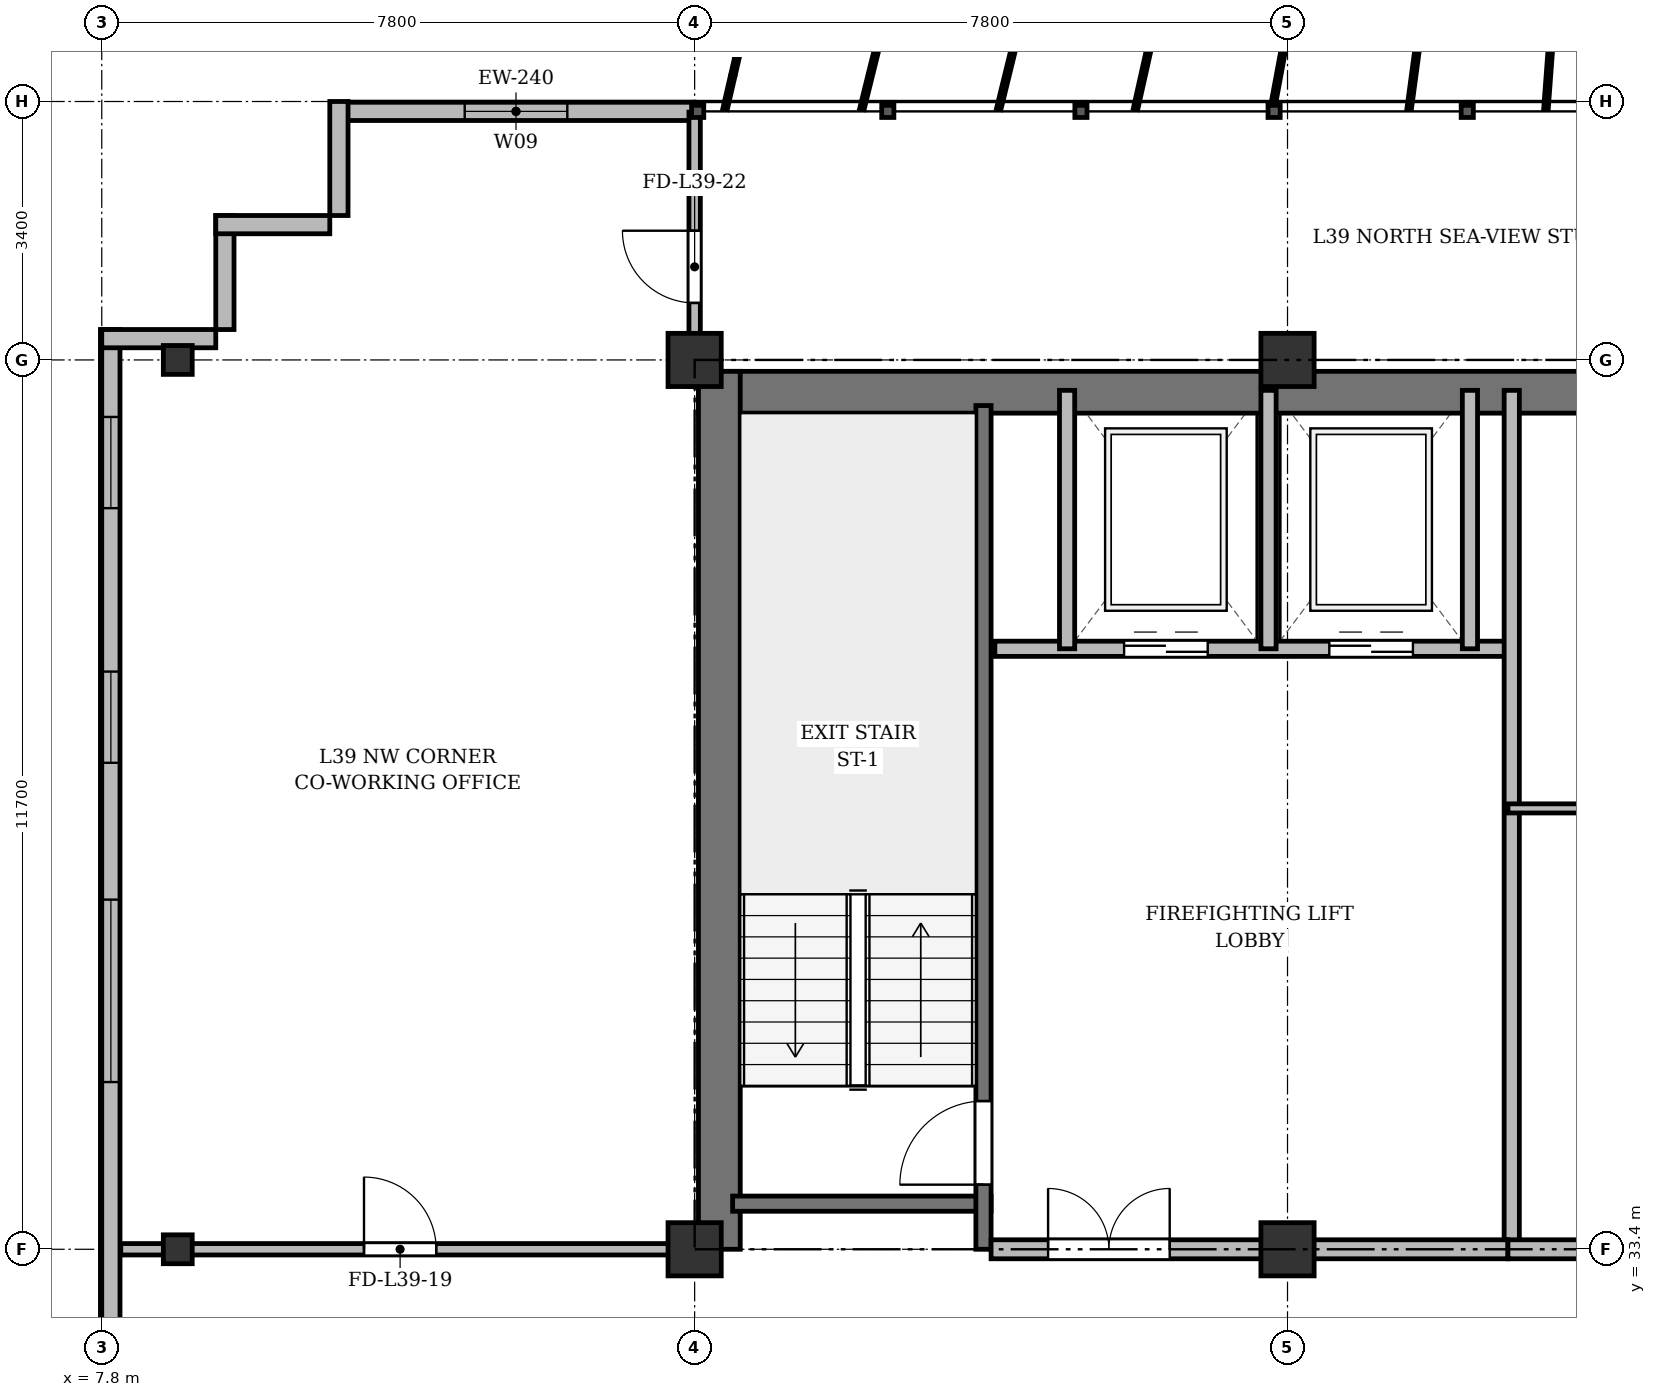
"""IFC4 building model, lengths in metres.
Left out: names, types, materials, properties, quantities, classifications, styles, units other than length and angle.
Written with IfcOpenShell. Run it as: python <this file> out.ifc"""

import sys

from ifc_helpers import new_model, si_unit, direction, frame, frame_2d, origin, origin_2d, place, context, subcontext, project, spatial, rectangle, i_section, extrude, source, transform, mapped, element, fill, save


model = new_model("IFC4")
c1 = context("Model", 3, precision=1e-05, world=origin(), true_north=direction((0.0, 1.0)))
c2 = subcontext(c1, "Body", "Model", "MODEL_VIEW")
j1 = project(units=[si_unit("LENGTHUNIT", "METRE"), si_unit("PLANEANGLEUNIT", "RADIAN")], contexts=[c1])
p1 = place(None, origin())
s1 = spatial("IfcSite", under=j1, at=p1, CompositionType="ELEMENT")
p2 = place(p1, origin())
s2 = spatial("IfcBuilding", under=s1, at=p2, CompositionType="ELEMENT")
p3 = place(p2, frame((0.0, 0.0, 150.1)))
s3 = spatial("IfcBuildingStorey", under=s2, at=p3, CompositionType="ELEMENT", Elevation=150.1)
m1 = source(origin(), c2, "Body", "SweptSolid", [
    extrude(i_section(OverallWidth=0.38, OverallDepth=0.38, WebThickness=0.02, FlangeThickness=0.03, at=origin_2d()), origin(), (0.0, 0.0, 1.0), 3.6),
])
for number, where, z_axis, x_axis in (
    (1, (8.8, 33.4, 0.0), (0.0, 0.0, 1.0), (1.0, 0.0, 0.0)),
    (2, (8.8, 45.1, 0.0), (0.0, 0.0, 1.0), (1.0, 0.0, 0.0)),
):
    element("IfcColumn", number, at=place(p3, frame(where, z_axis=z_axis, x_axis=x_axis)), inside=s3, PredefinedType="COLUMN", context=c2, shape_type="MappedRepresentation", body=[
        mapped(m1, transform((0.0, 0.0, 0.0), x_axis=(1.0, 0.0, 0.0), y_axis=(0.0, 1.0, 0.0), z_axis=(0.0, 0.0, 1.0), scale=1.0)),
    ])
m2 = source(origin(), c2, "Body", "SweptSolid", [
    extrude(rectangle(XDim=0.7, YDim=0.7, at=origin_2d()), origin(), (0.0, 0.0, 1.0), 3.6),
])
for number, where, z_axis, x_axis in (
    (3, (15.6, 33.4, 0.0), (0.0, 0.0, 1.0), (1.0, 0.0, 0.0)),
    (4, (15.6, 45.1, 0.0), (0.0, 0.0, 1.0), (1.0, 0.0, 0.0)),
    (5, (23.4, 33.4, 0.0), (0.0, 0.0, 1.0), (1.0, 0.0, 0.0)),
    (6, (23.4, 45.1, 0.0), (0.0, 0.0, 1.0), (1.0, 0.0, 0.0)),
):
    element("IfcColumn", number, at=place(p3, frame(where, z_axis=z_axis, x_axis=x_axis)), inside=s3, PredefinedType="COLUMN", context=c2, shape_type="MappedRepresentation", body=[
        mapped(m2, transform((0.0, 0.0, 0.0), x_axis=(1.0, 0.0, 0.0), y_axis=(0.0, 1.0, 0.0), z_axis=(0.0, 0.0, 1.0), scale=1.0)),
    ])
p4 = place(p3, frame((10.9, 48.37, 0.0), z_axis=(0.0, 0.0, 1.0), x_axis=(1.0, 0.0, 0.0)))
e7 = element("IfcWall", 7, at=p4, inside=s3, PredefinedType="SOLIDWALL", context=c2, shape_type="SweptSolid", body=[
    extrude(rectangle(XDim=4.7, YDim=0.24, at=frame_2d((2.35, 0.0))), origin(), (0.0, 0.0, 1.0), 3.35),
])
p5 = place(p4, frame((1.675, 0.0, 0.9)))
e8 = element("IfcOpeningElement", 8, at=p5, cuts=e7, PredefinedType="OPENING", context=c2, shape_type="SweptSolid", body=[
    extrude(rectangle(XDim=1.35, YDim=1.5, at=frame_2d((0.675, 0.75))), frame((0.0, 0.13, 0.0), z_axis=(0.0, -1.0, 0.0), x_axis=(1.0, 0.0, 0.0)), (0.0, 0.0, 1.0), 0.26),
])
p6 = place(p3, frame((7.92, 6.3, 0.0), z_axis=(0.0, 0.0, 1.0), x_axis=(0.0, 1.0, 0.0)))
e9 = element("IfcWall", 9, at=p6, inside=s3, PredefinedType="SOLIDWALL", context=c2, shape_type="SweptSolid", body=[
    extrude(rectangle(XDim=39.2, YDim=0.24, at=frame_2d((19.6, 0.0))), origin(), (0.0, 0.0, 1.0), 3.35),
])
p7 = place(p6, frame((1.45, 0.0, 0.92)))
e10 = element("IfcOpeningElement", 10, at=p7, cuts=e9, PredefinedType="OPENING", context=c2, shape_type="SweptSolid", body=[
    extrude(rectangle(XDim=1.2, YDim=1.65, at=frame_2d((0.6, 0.825))), frame((0.0, 0.13, 0.0), z_axis=(0.0, -1.0, 0.0), x_axis=(1.0, 0.0, 0.0)), (0.0, 0.0, 1.0), 0.26),
])
p8 = place(p6, frame((3.9, 0.0, 0.92)))
e11 = element("IfcOpeningElement", 11, at=p8, cuts=e9, PredefinedType="OPENING", context=c2, shape_type="SweptSolid", body=[
    extrude(rectangle(XDim=2.4, YDim=2.1, at=frame_2d((1.2, 1.05))), frame((0.0, 0.13, 0.0), z_axis=(0.0, -1.0, 0.0), x_axis=(1.0, 0.0, 0.0)), (0.0, 0.0, 1.0), 0.26),
])
p9 = place(p6, frame((8.1, 0.0, 0.92)))
e12 = element("IfcOpeningElement", 12, at=p9, cuts=e9, PredefinedType="OPENING", context=c2, shape_type="SweptSolid", body=[
    extrude(rectangle(XDim=2.4, YDim=2.1, at=frame_2d((1.2, 1.05))), frame((0.0, 0.13, 0.0), z_axis=(0.0, -1.0, 0.0), x_axis=(1.0, 0.0, 0.0)), (0.0, 0.0, 1.0), 0.26),
])
p10 = place(p6, frame((15.3, 0.0, 0.92)))
e13 = element("IfcOpeningElement", 13, at=p10, cuts=e9, PredefinedType="OPENING", context=c2, shape_type="SweptSolid", body=[
    extrude(rectangle(XDim=2.4, YDim=2.1, at=frame_2d((1.2, 1.05))), frame((0.0, 0.13, 0.0), z_axis=(0.0, -1.0, 0.0), x_axis=(1.0, 0.0, 0.0)), (0.0, 0.0, 1.0), 0.26),
])
p11 = place(p6, frame((29.3, 0.0, 0.92)))
e14 = element("IfcOpeningElement", 14, at=p11, cuts=e9, PredefinedType="OPENING", context=c2, shape_type="SweptSolid", body=[
    extrude(rectangle(XDim=2.4, YDim=2.1, at=frame_2d((1.2, 1.05))), frame((0.0, 0.13, 0.0), z_axis=(0.0, -1.0, 0.0), x_axis=(1.0, 0.0, 0.0)), (0.0, 0.0, 1.0), 0.26),
])
p12 = place(p6, frame((33.5, 0.0, 0.92)))
e15 = element("IfcOpeningElement", 15, at=p12, cuts=e9, PredefinedType="OPENING", context=c2, shape_type="SweptSolid", body=[
    extrude(rectangle(XDim=1.2, YDim=1.65, at=frame_2d((0.6, 0.825))), frame((0.0, 0.13, 0.0), z_axis=(0.0, -1.0, 0.0), x_axis=(1.0, 0.0, 0.0)), (0.0, 0.0, 1.0), 0.26),
])
p13 = place(p6, frame((36.85, 0.0, 0.92)))
e16 = element("IfcOpeningElement", 16, at=p13, cuts=e9, PredefinedType="OPENING", context=c2, shape_type="SweptSolid", body=[
    extrude(rectangle(XDim=1.2, YDim=1.65, at=frame_2d((0.6, 0.825))), frame((0.0, 0.13, 0.0), z_axis=(0.0, -1.0, 0.0), x_axis=(1.0, 0.0, 0.0)), (0.0, 0.0, 1.0), 0.26),
])
for number, where, z_axis, x_axis in (
    (17, (7.8, 45.38, 0.0), (0.0, 0.0, 1.0), (1.0, 0.0, 0.0)),
    (18, (9.42, 45.5, 0.0), (0.0, 0.0, 1.0), (0.0, 1.0, 0.0)),
    (19, (9.3, 46.88, 0.0), (0.0, 0.0, 1.0), (1.0, 0.0, 0.0)),
    (20, (10.92, 47.0, 0.0), (0.0, 0.0, 1.0), (0.0, 1.0, 0.0)),
):
    element("IfcWall", number, at=place(p3, frame(where, z_axis=z_axis, x_axis=x_axis)), inside=s3, PredefinedType="SOLIDWALL", context=c2, shape_type="SweptSolid", body=[
        extrude(rectangle(XDim=1.5, YDim=0.24, at=frame_2d((0.75, 0.0))), origin(), (0.0, 0.0, 1.0), 3.35),
    ])
p14 = place(p3, frame((15.65, 44.675, 0.0), z_axis=(0.0, 0.0, 1.0), x_axis=(1.0, 0.0, 0.0)))
e21 = element("IfcWall", 21, at=p14, inside=s3, PredefinedType="SHEAR", context=c2, shape_type="SweptSolid", body=[
    extrude(rectangle(XDim=43.1, YDim=0.55, at=frame_2d((21.55, 0.0))), origin(), (0.0, 0.0, 1.0), 3.35),
])
p15 = place(p3, frame((15.925, 33.4, 0.0), z_axis=(0.0, 0.0, 1.0), x_axis=(0.0, 1.0, 0.0)))
e22 = element("IfcWall", 22, at=p15, inside=s3, PredefinedType="SHEAR", context=c2, shape_type="SweptSolid", body=[
    extrude(rectangle(XDim=11.55, YDim=0.55, at=frame_2d((5.775, 0.0))), origin(), (0.0, 0.0, 1.0), 3.35),
])
p16 = place(p3, frame((16.1, 34.0, 0.0), z_axis=(0.0, 0.0, 1.0), x_axis=(1.0, 0.0, 0.0)))
e23 = element("IfcWall", 23, at=p16, inside=s3, PredefinedType="SHEAR", context=c2, shape_type="SweptSolid", body=[
    extrude(rectangle(XDim=3.4, YDim=0.2, at=frame_2d((1.7, 0.0))), origin(), (0.0, 0.0, 1.0), 3.35),
])
p17 = place(p3, frame((19.4, 33.4, 0.0), z_axis=(0.0, 0.0, 1.0), x_axis=(0.0, 1.0, 0.0)))
e24 = element("IfcWall", 24, at=p17, inside=s3, PredefinedType="SHEAR", context=c2, shape_type="SweptSolid", body=[
    extrude(rectangle(XDim=11.1, YDim=0.2, at=frame_2d((5.55, 0.0))), origin(), (0.0, 0.0, 1.0), 3.35),
])
p18 = place(p17, frame((0.85, 0.0, 0.0)))
e25 = element("IfcOpeningElement", 25, at=p18, cuts=e24, PredefinedType="OPENING", context=c2, shape_type="SweptSolid", body=[
    extrude(rectangle(XDim=1.1, YDim=2.15, at=frame_2d((0.55, 1.075))), frame((0.0, 0.11, 0.0), z_axis=(0.0, -1.0, 0.0), x_axis=(1.0, 0.0, 0.0)), (0.0, 0.0, 1.0), 0.22),
])
p19 = place(p3, frame((19.55, 41.3, 0.0), z_axis=(0.0, 0.0, 1.0), x_axis=(1.0, 0.0, 0.0)))
e26 = element("IfcWall", 26, at=p19, inside=s3, PredefinedType="SOLIDWALL", context=c2, shape_type="SweptSolid", body=[
    extrude(rectangle(XDim=6.75, YDim=0.2, at=frame_2d((3.375, 0.0))), origin(), (0.0, 0.0, 1.0), 3.35),
])
p20 = place(p19, frame((1.7, 0.0, 0.0)))
e27 = element("IfcOpeningElement", 27, at=p20, cuts=e26, PredefinedType="OPENING", context=c2, shape_type="SweptSolid", body=[
    extrude(rectangle(XDim=1.1, YDim=2.15, at=frame_2d((0.55, 1.075))), frame((0.0, 0.11, 0.0), z_axis=(0.0, -1.0, 0.0), x_axis=(1.0, 0.0, 0.0)), (0.0, 0.0, 1.0), 0.22),
])
p21 = place(p19, frame((4.4, 0.0, 0.0)))
e28 = element("IfcOpeningElement", 28, at=p21, cuts=e26, PredefinedType="OPENING", context=c2, shape_type="SweptSolid", body=[
    extrude(rectangle(XDim=1.1, YDim=2.15, at=frame_2d((0.55, 1.075))), frame((0.0, 0.11, 0.0), z_axis=(0.0, -1.0, 0.0), x_axis=(1.0, 0.0, 0.0)), (0.0, 0.0, 1.0), 0.22),
])
for number, where, z_axis, x_axis in (
    (29, (20.5, 41.3, 0.0), (0.0, 0.0, 1.0), (0.0, 1.0, 0.0)),
    (30, (23.15, 41.3, 0.0), (0.0, 0.0, 1.0), (0.0, 1.0, 0.0)),
    (31, (25.8, 41.3, 0.0), (0.0, 0.0, 1.0), (0.0, 1.0, 0.0)),
):
    element("IfcWall", number, at=place(p3, frame(where, z_axis=z_axis, x_axis=x_axis)), inside=s3, PredefinedType="SOLIDWALL", context=c2, shape_type="SweptSolid", body=[
        extrude(rectangle(XDim=3.4, YDim=0.2, at=frame_2d((1.7, 0.0))), origin(), (0.0, 0.0, 1.0), 3.35),
    ])
p22 = place(p3, frame((26.35, 33.4, 0.0), z_axis=(0.0, 0.0, 1.0), x_axis=(0.0, 1.0, 0.0)))
e32 = element("IfcWall", 32, at=p22, inside=s3, PredefinedType="SOLIDWALL", context=c2, shape_type="SweptSolid", body=[
    extrude(rectangle(XDim=11.3, YDim=0.2, at=frame_2d((5.65, 0.0))), origin(), (0.0, 0.0, 1.0), 2.75),
])
p23 = place(p3, frame((19.5, 33.4, 0.0), z_axis=(0.0, 0.0, 1.0), x_axis=(1.0, 0.0, 0.0)))
e33 = element("IfcWall", 33, at=p23, inside=s3, PredefinedType="PARTITIONING", context=c2, shape_type="SweptSolid", body=[
    extrude(rectangle(XDim=6.8, YDim=0.25, at=frame_2d((3.4, 0.0))), origin(), (0.0, 0.0, 1.0), 2.75),
])
p24 = place(p23, frame((0.75, 0.0, 0.0)))
e34 = element("IfcOpeningElement", 34, at=p24, cuts=e33, PredefinedType="OPENING", context=c2, shape_type="SweptSolid", body=[
    extrude(rectangle(XDim=1.6, YDim=2.2, at=frame_2d((0.8, 1.1))), frame((0.0, 0.135, 0.0), z_axis=(0.0, -1.0, 0.0), x_axis=(1.0, 0.0, 0.0)), (0.0, 0.0, 1.0), 0.27),
])
p25 = place(p3, frame((26.3, 39.2, 0.0), z_axis=(0.0, 0.0, 1.0), x_axis=(1.0, 0.0, 0.0)))
e35 = element("IfcWall", 35, at=p25, inside=s3, PredefinedType="PARTITIONING", context=c2, shape_type="SweptSolid", body=[
    extrude(rectangle(XDim=7.0, YDim=0.12, at=frame_2d((3.5, 0.0))), origin(), (0.0, 0.0, 1.0), 2.85),
])
p26 = place(p25, frame((2.6, 0.0, 0.0)))
e36 = element("IfcOpeningElement", 36, at=p26, cuts=e35, PredefinedType="OPENING", context=c2, shape_type="SweptSolid", body=[
    extrude(rectangle(XDim=0.95, YDim=2.15, at=frame_2d((0.475, 1.075))), frame((0.0, 0.07, 0.0), z_axis=(0.0, -1.0, 0.0), x_axis=(1.0, 0.0, 0.0)), (0.0, 0.0, 1.0), 0.14),
])
p27 = place(p3, frame((26.3, 33.4, 0.0), z_axis=(0.0, 0.0, 1.0), x_axis=(1.0, 0.0, 0.0)))
e37 = element("IfcWall", 37, at=p27, inside=s3, PredefinedType="PARTITIONING", context=c2, shape_type="SweptSolid", body=[
    extrude(rectangle(XDim=7.0, YDim=0.25, at=frame_2d((3.5, 0.0))), origin(), (0.0, 0.0, 1.0), 2.75),
])
p28 = place(p27, frame((1.35, 0.0, 0.0)))
e38 = element("IfcOpeningElement", 38, at=p28, cuts=e37, PredefinedType="OPENING", context=c2, shape_type="SweptSolid", body=[
    extrude(rectangle(XDim=0.95, YDim=2.15, at=frame_2d((0.475, 1.075))), frame((0.0, 0.135, 0.0), z_axis=(0.0, -1.0, 0.0), x_axis=(1.0, 0.0, 0.0)), (0.0, 0.0, 1.0), 0.27),
])
p29 = place(p3, frame((8.05, 33.4, 0.0), z_axis=(0.0, 0.0, 1.0), x_axis=(1.0, 0.0, 0.0)))
e39 = element("IfcWall", 39, at=p29, inside=s3, PredefinedType="PARTITIONING", context=c2, shape_type="SweptSolid", body=[
    extrude(rectangle(XDim=7.55, YDim=0.15, at=frame_2d((3.775, 0.0))), origin(), (0.0, 0.0, 1.0), 2.75),
])
p30 = place(p29, frame((3.2, 0.0, 0.0)))
e40 = element("IfcOpeningElement", 40, at=p30, cuts=e39, PredefinedType="OPENING", context=c2, shape_type="SweptSolid", body=[
    extrude(rectangle(XDim=0.95, YDim=2.15, at=frame_2d((0.475, 1.075))), frame((0.0, 0.085, 0.0), z_axis=(0.0, -1.0, 0.0), x_axis=(1.0, 0.0, 0.0)), (0.0, 0.0, 1.0), 0.17),
])
p31 = place(p3, frame((15.6, 44.75, 0.0), z_axis=(0.0, 0.0, 1.0), x_axis=(0.0, 1.0, 0.0)))
e41 = element("IfcWall", 41, at=p31, inside=s3, PredefinedType="PARTITIONING", context=c2, shape_type="SweptSolid", body=[
    extrude(rectangle(XDim=3.61, YDim=0.15, at=frame_2d((1.805, 0.0))), origin(), (0.0, 0.0, 1.0), 2.85),
])
p32 = place(p31, frame((1.1, 0.0, 0.0)))
e42 = element("IfcOpeningElement", 42, at=p32, cuts=e41, PredefinedType="OPENING", context=c2, shape_type="SweptSolid", body=[
    extrude(rectangle(XDim=0.95, YDim=2.15, at=frame_2d((0.475, 1.075))), frame((0.0, 0.085, 0.0), z_axis=(0.0, -1.0, 0.0), x_axis=(1.0, 0.0, 0.0)), (0.0, 0.0, 1.0), 0.17),
])
m3 = source(origin(), c2, "Body", "SweptSolid", [
    extrude(rectangle(XDim=1.35, YDim=1.5, at=frame_2d((0.675, 0.75))), frame((0.0, 0.03, 0.0), z_axis=(0.0, -1.0, 0.0), x_axis=(1.0, 0.0, 0.0)), (0.0, 0.0, 1.0), 0.06),
])
p33 = place(p5, origin())
e43 = element("IfcWindow", 43, at=p33, inside=s3, PartitioningType="SINGLE_PANEL", PredefinedType="WINDOW", context=c2, shape_type="MappedRepresentation", body=[
    mapped(m3, transform((0.0, 0.0, 0.0), x_axis=(1.0, 0.0, 0.0), y_axis=(0.0, 1.0, 0.0), z_axis=(0.0, 0.0, 1.0), scale=1.0)),
])
fill(e8, e43)
m4 = source(origin(), c2, "Body", "SweptSolid", [
    extrude(rectangle(XDim=2.4, YDim=2.1, at=frame_2d((1.2, 1.05))), frame((0.0, 0.03, 0.0), z_axis=(0.0, -1.0, 0.0), x_axis=(1.0, 0.0, 0.0)), (0.0, 0.0, 1.0), 0.06),
])
p34 = place(p11, origin())
e44 = element("IfcWindow", 44, at=p34, inside=s3, PartitioningType="SINGLE_PANEL", PredefinedType="WINDOW", context=c2, shape_type="MappedRepresentation", body=[
    mapped(m4, transform((0.0, 0.0, 0.0), x_axis=(1.0, 0.0, 0.0), y_axis=(0.0, 1.0, 0.0), z_axis=(0.0, 0.0, 1.0), scale=1.0)),
])
fill(e14, e44)
m5 = source(origin(), c2, "Body", "SweptSolid", [
    extrude(rectangle(XDim=1.2, YDim=1.65, at=frame_2d((0.6, 0.825))), frame((0.0, 0.03, 0.0), z_axis=(0.0, -1.0, 0.0), x_axis=(1.0, 0.0, 0.0)), (0.0, 0.0, 1.0), 0.06),
])
p35 = place(p12, origin())
e45 = element("IfcWindow", 45, at=p35, inside=s3, PartitioningType="SINGLE_PANEL", PredefinedType="WINDOW", context=c2, shape_type="MappedRepresentation", body=[
    mapped(m5, transform((0.0, 0.0, 0.0), x_axis=(1.0, 0.0, 0.0), y_axis=(0.0, 1.0, 0.0), z_axis=(0.0, 0.0, 1.0), scale=1.0)),
])
fill(e15, e45)
p36 = place(p13, origin())
e46 = element("IfcWindow", 46, at=p36, inside=s3, PartitioningType="SINGLE_PANEL", PredefinedType="WINDOW", context=c2, shape_type="MappedRepresentation", body=[
    mapped(m5, transform((0.0, 0.0, 0.0), x_axis=(1.0, 0.0, 0.0), y_axis=(0.0, 1.0, 0.0), z_axis=(0.0, 0.0, 1.0), scale=1.0)),
])
fill(e16, e46)
m6 = source(origin(), c2, "Body", "SweptSolid", [
    extrude(rectangle(XDim=1.1, YDim=2.15, at=frame_2d((0.55, 1.075))), frame((0.0, 0.025, 0.0), z_axis=(0.0, -1.0, 0.0), x_axis=(1.0, 0.0, 0.0)), (0.0, 0.0, 1.0), 0.05),
])
p37 = place(p18, origin())
e47 = element("IfcDoor", 47, at=p37, inside=s3, OperationType="SINGLE_SWING_LEFT", PredefinedType="DOOR", context=c2, shape_type="MappedRepresentation", body=[
    mapped(m6, transform((0.0, 0.0, 0.0), x_axis=(1.0, 0.0, 0.0), y_axis=(0.0, 1.0, 0.0), z_axis=(0.0, 0.0, 1.0), scale=1.0)),
])
fill(e25, e47)
p38 = place(p20, origin())
e48 = element("IfcDoor", 48, at=p38, inside=s3, OperationType="DOUBLE_DOOR_SLIDING", PredefinedType="DOOR", context=c2, shape_type="MappedRepresentation", body=[
    mapped(m6, transform((0.0, 0.0, 0.0), x_axis=(1.0, 0.0, 0.0), y_axis=(0.0, 1.0, 0.0), z_axis=(0.0, 0.0, 1.0), scale=1.0)),
])
fill(e27, e48)
p39 = place(p21, origin())
e49 = element("IfcDoor", 49, at=p39, inside=s3, OperationType="DOUBLE_DOOR_SLIDING", PredefinedType="DOOR", context=c2, shape_type="MappedRepresentation", body=[
    mapped(m6, transform((0.0, 0.0, 0.0), x_axis=(1.0, 0.0, 0.0), y_axis=(0.0, 1.0, 0.0), z_axis=(0.0, 0.0, 1.0), scale=1.0)),
])
fill(e28, e49)
m7 = source(origin(), c2, "Body", "SweptSolid", [
    extrude(rectangle(XDim=1.6, YDim=2.2, at=frame_2d((0.8, 1.1))), frame((0.0, 0.025, 0.0), z_axis=(0.0, -1.0, 0.0), x_axis=(1.0, 0.0, 0.0)), (0.0, 0.0, 1.0), 0.05),
])
p40 = place(p24, origin())
e50 = element("IfcDoor", 50, at=p40, inside=s3, OperationType="DOUBLE_DOOR_SINGLE_SWING", PredefinedType="DOOR", context=c2, shape_type="MappedRepresentation", body=[
    mapped(m7, transform((0.0, 0.0, 0.0), x_axis=(1.0, 0.0, 0.0), y_axis=(0.0, 1.0, 0.0), z_axis=(0.0, 0.0, 1.0), scale=1.0)),
])
fill(e34, e50)
m8 = source(origin(), c2, "Body", "SweptSolid", [
    extrude(rectangle(XDim=0.95, YDim=2.15, at=frame_2d((0.475, 1.075))), frame((0.0, 0.025, 0.0), z_axis=(0.0, -1.0, 0.0), x_axis=(1.0, 0.0, 0.0)), (0.0, 0.0, 1.0), 0.05),
])
p41 = place(p30, origin())
e51 = element("IfcDoor", 51, at=p41, inside=s3, OperationType="SINGLE_SWING_LEFT", PredefinedType="DOOR", context=c2, shape_type="MappedRepresentation", body=[
    mapped(m8, transform((0.0, 0.0, 0.0), x_axis=(1.0, 0.0, 0.0), y_axis=(0.0, 1.0, 0.0), z_axis=(0.0, 0.0, 1.0), scale=1.0)),
])
fill(e40, e51)
p42 = place(p32, origin())
e52 = element("IfcDoor", 52, at=p42, inside=s3, OperationType="SINGLE_SWING_RIGHT", PredefinedType="DOOR", context=c2, shape_type="MappedRepresentation", body=[
    mapped(m8, transform((0.0, 0.0, 0.0), x_axis=(1.0, 0.0, 0.0), y_axis=(0.0, 1.0, 0.0), z_axis=(0.0, 0.0, 1.0), scale=1.0)),
])
fill(e42, e52)
save(model, sys.argv[1])
